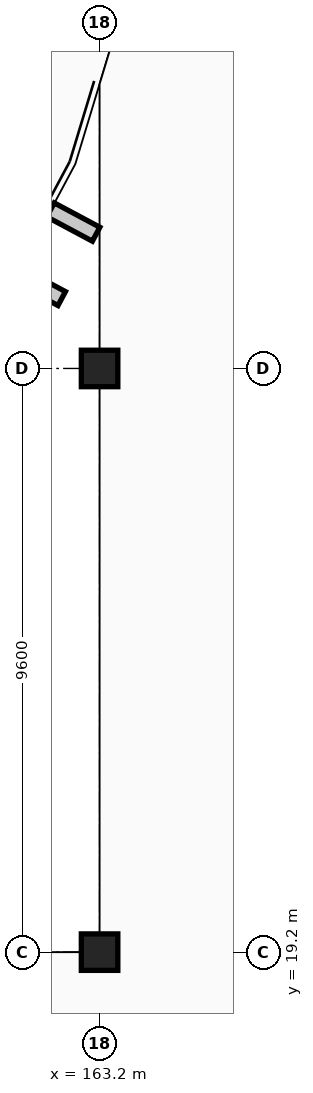
"""IFC4 building model, lengths in metres.
Left out: names, types, materials, properties, quantities, classifications, styles, units other than length and angle.
Written with IfcOpenShell. Run it as: python <this file> out.ifc"""

import sys

from ifc_helpers import new_model, si_unit, direction, frame, origin, origin_2d, place, context, subcontext, project, spatial, rectangle, extrude, element, save


model = new_model("IFC4")
c1 = context("Model", 3, precision=1e-05, world=origin(), true_north=direction((0.0, 1.0)))
c2 = subcontext(c1, "Body", "Model", "MODEL_VIEW")
j1 = project(units=[si_unit("LENGTHUNIT", "METRE"), si_unit("PLANEANGLEUNIT", "RADIAN")], contexts=[c1])
p1 = place(None, origin())
s1 = spatial("IfcSite", under=j1, at=p1, CompositionType="ELEMENT")
p2 = place(p1, origin())
s2 = spatial("IfcBuilding", under=s1, at=p2, CompositionType="ELEMENT")
p3 = place(p2, frame((0.0, 0.0, 4.8)))
s3 = spatial("IfcBuildingStorey", under=s2, at=p3, CompositionType="ELEMENT", Elevation=4.8)
for number, where, z_axis, x_axis in (
    (1, (163.2, 19.2, 0.0), (0.0, 0.0, 1.0), (1.0, 0.0, 0.0)),
    (2, (163.2, 28.8, 0.0), (0.0, 0.0, 1.0), (1.0, 0.0, 0.0)),
):
    element("IfcColumn", number, at=place(p3, frame(where, z_axis=z_axis, x_axis=x_axis)), inside=s3, PredefinedType="COLUMN", context=c2, shape_type="SweptSolid", body=[
        extrude(rectangle(XDim=0.6, YDim=0.6, at=origin_2d()), origin(), (0.0, 0.0, 1.0), 4.8),
    ])
save(model, sys.argv[1])
